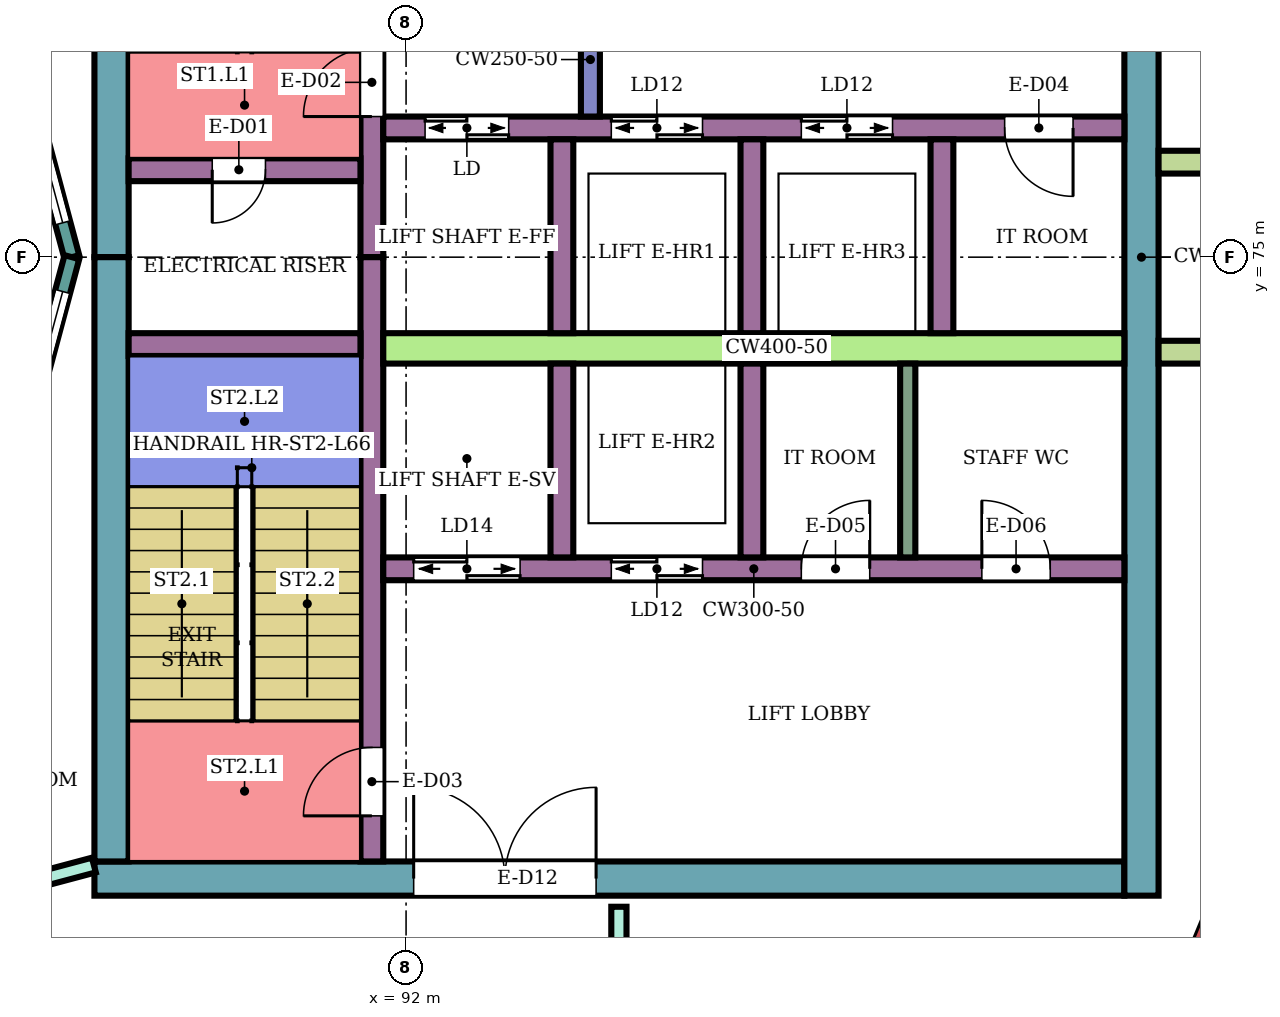
"""IFC4 building model, lengths in metres.
Left out: names, types, materials, properties, quantities, classifications, styles, units other than length and angle.
Written with IfcOpenShell. Run it as: python <this file> out.ifc"""

import sys

from ifc_helpers import new_model, si_unit, direction, frame, frame_2d, origin, place, context, subcontext, project, spatial, rectangle, extrude, element, fill, save


model = new_model("IFC4")
c1 = context("Model", 3, precision=1e-05, world=origin(), true_north=direction((0.0, 1.0)))
c2 = subcontext(c1, "Body", "Model", "MODEL_VIEW")
j1 = project(units=[si_unit("LENGTHUNIT", "METRE"), si_unit("PLANEANGLEUNIT", "RADIAN")], contexts=[c1])
p1 = place(None, origin())
s1 = spatial("IfcSite", under=j1, at=p1, CompositionType="ELEMENT")
p2 = place(p1, origin())
s2 = spatial("IfcBuilding", under=s1, at=p2, CompositionType="ELEMENT")
p3 = place(p2, frame((0.0, 0.0, 288.3)))
s3 = spatial("IfcBuildingStorey", under=s2, at=p3, CompositionType="ELEMENT", Elevation=288.3)
p4 = place(p3, frame((87.9, 66.825, 0.0), z_axis=(0.0, 0.0, 1.0), x_axis=(1.0, 0.0, 0.0)))
e1 = element("IfcWall", 1, at=p4, inside=s3, PredefinedType="SHEAR", context=c2, shape_type="SweptSolid", body=[
    extrude(rectangle(XDim=13.55, YDim=0.45, at=frame_2d((6.775, 0.0))), origin(), (0.0, 0.0, 1.0), 3.88),
])
p5 = place(p4, frame((4.2, 0.0, 0.0)))
e2 = element("IfcOpeningElement", 2, at=p5, cuts=e1, PredefinedType="OPENING", context=c2, shape_type="SweptSolid", body=[
    extrude(rectangle(XDim=2.4, YDim=2.4, at=frame_2d((1.2, 1.2))), frame((0.0, 0.235, 0.0), z_axis=(0.0, -1.0, 0.0), x_axis=(1.0, 0.0, 0.0)), (0.0, 0.0, 1.0), 0.47),
])
for number, where, z_axis, x_axis in (
    (3, (88.125, 75.0, 0.0), (0.0, 0.0, 1.0), (0.0, 1.0, 0.0)),
    (4, (88.125, 67.05, 0.0), (0.0, 0.0, 1.0), (0.0, 1.0, 0.0)),
):
    element("IfcWall", number, at=place(p3, frame(where, z_axis=z_axis, x_axis=x_axis)), inside=s3, PredefinedType="SHEAR", context=c2, shape_type="SweptSolid", body=[
        extrude(rectangle(XDim=7.95, YDim=0.45, at=frame_2d((3.975, 0.0))), origin(), (0.0, 0.0, 1.0), 3.88),
    ])
p6 = place(p3, frame((101.675, 66.6, 0.0), z_axis=(0.0, 0.0, 1.0), x_axis=(0.0, 1.0, 0.0)))
e5 = element("IfcWall", 5, at=p6, inside=s3, PredefinedType="SHEAR", context=c2, shape_type="SweptSolid", body=[
    extrude(rectangle(XDim=16.8, YDim=0.45, at=frame_2d((8.4, 0.0))), origin(), (0.0, 0.0, 1.0), 3.88),
])
p7 = place(p3, frame((91.55, 75.0, 0.0), z_axis=(0.0, 0.0, 1.0), x_axis=(0.0, 1.0, 0.0)))
e6 = element("IfcWall", 6, at=p7, inside=s3, PredefinedType="SHEAR", context=c2, shape_type="SweptSolid", body=[
    extrude(rectangle(XDim=7.95, YDim=0.3, at=frame_2d((3.975, 0.0))), origin(), (0.0, 0.0, 1.0), 3.88),
])
p8 = place(p7, frame((1.85, 0.0, 0.0)))
e7 = element("IfcOpeningElement", 7, at=p8, cuts=e6, PredefinedType="OPENING", context=c2, shape_type="SweptSolid", body=[
    extrude(rectangle(XDim=0.9, YDim=2.1, at=frame_2d((0.45, 1.05))), frame((0.0, 0.16, 0.0), z_axis=(0.0, -1.0, 0.0), x_axis=(1.0, 0.0, 0.0)), (0.0, 0.0, 1.0), 0.32),
])
p9 = place(p3, frame((91.55, 67.05, 0.0), z_axis=(0.0, 0.0, 1.0), x_axis=(0.0, 1.0, 0.0)))
e8 = element("IfcWall", 8, at=p9, inside=s3, PredefinedType="SHEAR", context=c2, shape_type="SweptSolid", body=[
    extrude(rectangle(XDim=7.95, YDim=0.3, at=frame_2d((3.975, 0.0))), origin(), (0.0, 0.0, 1.0), 3.88),
])
p10 = place(p9, frame((0.6, 0.0, 0.0)))
e9 = element("IfcOpeningElement", 9, at=p10, cuts=e8, PredefinedType="OPENING", context=c2, shape_type="SweptSolid", body=[
    extrude(rectangle(XDim=0.9, YDim=2.1, at=frame_2d((0.45, 1.05))), frame((0.0, 0.16, 0.0), z_axis=(0.0, -1.0, 0.0), x_axis=(1.0, 0.0, 0.0)), (0.0, 0.0, 1.0), 0.32),
])
p11 = place(p3, frame((88.35, 76.15, 0.0), z_axis=(0.0, 0.0, 1.0), x_axis=(1.0, 0.0, 0.0)))
e10 = element("IfcWall", 10, at=p11, inside=s3, PredefinedType="SHEAR", context=c2, shape_type="SweptSolid", body=[
    extrude(rectangle(XDim=3.05, YDim=0.3, at=frame_2d((1.525, 0.0))), origin(), (0.0, 0.0, 1.0), 3.88),
])
p12 = place(p11, frame((1.1, 0.0, 0.0)))
e11 = element("IfcOpeningElement", 11, at=p12, cuts=e10, PredefinedType="OPENING", context=c2, shape_type="SweptSolid", body=[
    extrude(rectangle(XDim=0.7, YDim=2.0, at=frame_2d((0.35, 1.0))), frame((0.0, 0.16, 0.0), z_axis=(0.0, -1.0, 0.0), x_axis=(1.0, 0.0, 0.0)), (0.0, 0.0, 1.0), 0.32),
])
p13 = place(p3, frame((88.35, 73.85, 0.0), z_axis=(0.0, 0.0, 1.0), x_axis=(1.0, 0.0, 0.0)))
e12 = element("IfcWall", 12, at=p13, inside=s3, PredefinedType="SHEAR", context=c2, shape_type="SweptSolid", body=[
    extrude(rectangle(XDim=3.05, YDim=0.3, at=frame_2d((1.525, 0.0))), origin(), (0.0, 0.0, 1.0), 3.88),
])
p14 = place(p3, frame((91.7, 76.7, 0.0), z_axis=(0.0, 0.0, 1.0), x_axis=(1.0, 0.0, 0.0)))
e13 = element("IfcWall", 13, at=p14, inside=s3, PredefinedType="SHEAR", context=c2, shape_type="SweptSolid", body=[
    extrude(rectangle(XDim=9.75, YDim=0.3, at=frame_2d((4.875, 0.0))), origin(), (0.0, 0.0, 1.0), 3.88),
])
p15 = place(p14, frame((0.55, 0.0, 0.0)))
e14 = element("IfcOpeningElement", 14, at=p15, cuts=e13, PredefinedType="OPENING", context=c2, shape_type="SweptSolid", body=[
    extrude(rectangle(XDim=1.1, YDim=2.1, at=frame_2d((0.55, 1.05))), frame((0.0, 0.16, 0.0), z_axis=(0.0, -1.0, 0.0), x_axis=(1.0, 0.0, 0.0)), (0.0, 0.0, 1.0), 0.32),
])
p16 = place(p14, frame((3.0, 0.0, 0.0)))
e15 = element("IfcOpeningElement", 15, at=p16, cuts=e13, PredefinedType="OPENING", context=c2, shape_type="SweptSolid", body=[
    extrude(rectangle(XDim=1.2, YDim=2.1, at=frame_2d((0.6, 1.05))), frame((0.0, 0.16, 0.0), z_axis=(0.0, -1.0, 0.0), x_axis=(1.0, 0.0, 0.0)), (0.0, 0.0, 1.0), 0.32),
])
p17 = place(p14, frame((5.5, 0.0, 0.0)))
e16 = element("IfcOpeningElement", 16, at=p17, cuts=e13, PredefinedType="OPENING", context=c2, shape_type="SweptSolid", body=[
    extrude(rectangle(XDim=1.2, YDim=2.1, at=frame_2d((0.6, 1.05))), frame((0.0, 0.16, 0.0), z_axis=(0.0, -1.0, 0.0), x_axis=(1.0, 0.0, 0.0)), (0.0, 0.0, 1.0), 0.32),
])
p18 = place(p14, frame((8.175, 0.0, 0.0)))
e17 = element("IfcOpeningElement", 17, at=p18, cuts=e13, PredefinedType="OPENING", context=c2, shape_type="SweptSolid", body=[
    extrude(rectangle(XDim=0.9, YDim=2.1, at=frame_2d((0.45, 1.05))), frame((0.0, 0.16, 0.0), z_axis=(0.0, -1.0, 0.0), x_axis=(1.0, 0.0, 0.0)), (0.0, 0.0, 1.0), 0.32),
])
p19 = place(p3, frame((91.7, 73.8, 0.0), z_axis=(0.0, 0.0, 1.0), x_axis=(1.0, 0.0, 0.0)))
e18 = element("IfcWall", 18, at=p19, inside=s3, PredefinedType="SHEAR", context=c2, shape_type="SweptSolid", body=[
    extrude(rectangle(XDim=9.75, YDim=0.4, at=frame_2d((4.875, 0.0))), origin(), (0.0, 0.0, 1.0), 3.88),
])
p20 = place(p3, frame((91.7, 70.9, 0.0), z_axis=(0.0, 0.0, 1.0), x_axis=(1.0, 0.0, 0.0)))
e19 = element("IfcWall", 19, at=p20, inside=s3, PredefinedType="SHEAR", context=c2, shape_type="SweptSolid", body=[
    extrude(rectangle(XDim=9.75, YDim=0.3, at=frame_2d((4.875, 0.0))), origin(), (0.0, 0.0, 1.0), 3.88),
])
p21 = place(p20, frame((0.4, 0.0, 0.0)))
e20 = element("IfcOpeningElement", 20, at=p21, cuts=e19, PredefinedType="OPENING", context=c2, shape_type="SweptSolid", body=[
    extrude(rectangle(XDim=1.4, YDim=2.1, at=frame_2d((0.7, 1.05))), frame((0.0, 0.16, 0.0), z_axis=(0.0, -1.0, 0.0), x_axis=(1.0, 0.0, 0.0)), (0.0, 0.0, 1.0), 0.32),
])
p22 = place(p20, frame((3.0, 0.0, 0.0)))
e21 = element("IfcOpeningElement", 21, at=p22, cuts=e19, PredefinedType="OPENING", context=c2, shape_type="SweptSolid", body=[
    extrude(rectangle(XDim=1.2, YDim=2.1, at=frame_2d((0.6, 1.05))), frame((0.0, 0.16, 0.0), z_axis=(0.0, -1.0, 0.0), x_axis=(1.0, 0.0, 0.0)), (0.0, 0.0, 1.0), 0.32),
])
p23 = place(p20, frame((5.5, 0.0, 0.0)))
e22 = element("IfcOpeningElement", 22, at=p23, cuts=e19, PredefinedType="OPENING", context=c2, shape_type="SweptSolid", body=[
    extrude(rectangle(XDim=0.9, YDim=2.1, at=frame_2d((0.45, 1.05))), frame((0.0, 0.16, 0.0), z_axis=(0.0, -1.0, 0.0), x_axis=(1.0, 0.0, 0.0)), (0.0, 0.0, 1.0), 0.32),
])
p24 = place(p20, frame((7.875, 0.0, 0.0)))
e23 = element("IfcOpeningElement", 23, at=p24, cuts=e19, PredefinedType="OPENING", context=c2, shape_type="SweptSolid", body=[
    extrude(rectangle(XDim=0.9, YDim=2.1, at=frame_2d((0.45, 1.05))), frame((0.0, 0.16, 0.0), z_axis=(0.0, -1.0, 0.0), x_axis=(1.0, 0.0, 0.0)), (0.0, 0.0, 1.0), 0.32),
])
for number, where, z_axis, x_axis in (
    (24, (94.05, 74.0, 0.0), (0.0, 0.0, 1.0), (0.0, 1.0, 0.0)),
    (25, (96.55, 74.0, 0.0), (0.0, 0.0, 1.0), (0.0, 1.0, 0.0)),
    (26, (99.05, 74.0, 0.0), (0.0, 0.0, 1.0), (0.0, 1.0, 0.0)),
    (27, (94.05, 71.05, 0.0), (0.0, 0.0, 1.0), (0.0, 1.0, 0.0)),
    (28, (96.55, 71.05, 0.0), (0.0, 0.0, 1.0), (0.0, 1.0, 0.0)),
):
    element("IfcWall", number, at=place(p3, frame(where, z_axis=z_axis, x_axis=x_axis)), inside=s3, PredefinedType="SHEAR", context=c2, shape_type="SweptSolid", body=[
        extrude(rectangle(XDim=2.55, YDim=0.3, at=frame_2d((1.275, 0.0))), origin(), (0.0, 0.0, 1.0), 3.88),
    ])
p25 = place(p3, frame((94.425, 76.85, 0.0), z_axis=(0.0, 0.0, 1.0), x_axis=(0.0, 1.0, 0.0)))
e29 = element("IfcWall", 29, at=p25, inside=s3, PredefinedType="SHEAR", context=c2, shape_type="SweptSolid", body=[
    extrude(rectangle(XDim=1.5, YDim=0.25, at=frame_2d((0.75, 0.0))), origin(), (0.0, 0.0, 1.0), 3.88),
])
for number, where, z_axis, x_axis in (
    (30, (101.9, 73.75, 0.0), (0.0, 0.0, 1.0), (1.0, 0.0, 0.0)),
    (31, (101.9, 76.25, 0.0), (0.0, 0.0, 1.0), (1.0, 0.0, 0.0)),
):
    element("IfcWall", number, at=place(p3, frame(where, z_axis=z_axis, x_axis=x_axis)), inside=s3, PredefinedType="NOTDEFINED", context=c2, shape_type="SweptSolid", body=[
        extrude(rectangle(XDim=2.416, YDim=0.3, at=frame_2d((1.208, 0.0))), origin(), (0.0, 0.0, 1.0), 4.2),
    ])
p26 = place(p3, frame((87.604, 75.0, 0.0), z_axis=(0.0, 0.0, 1.0), x_axis=(-0.258789828301, 0.965933654434, 0.0)))
e32 = element("IfcWall", 32, at=p26, inside=s3, PredefinedType="NOTDEFINED", context=c2, shape_type="SweptSolid", body=[
    extrude(rectangle(XDim=3.936, YDim=0.2, at=frame_2d((1.968, 0.0))), origin(), (0.0, 0.0, 1.0), 4.2),
])
p27 = place(p26, frame((0.468, 0.0, 0.9)))
e33 = element("IfcOpeningElement", 33, at=p27, cuts=e32, PredefinedType="OPENING", context=c2, shape_type="SweptSolid", body=[
    extrude(rectangle(XDim=3.0, YDim=2.3, at=frame_2d((1.5, 1.15))), frame((0.0, 0.11, 0.0), z_axis=(0.0, -1.0, 0.0), x_axis=(1.0, 0.0, 0.0)), (0.0, 0.0, 1.0), 0.22),
])
p28 = place(p3, frame((86.585, 71.198, 0.0), z_axis=(0.0, 0.0, 1.0), x_axis=(0.258789828301, 0.965933654434, 0.0)))
e34 = element("IfcWall", 34, at=p28, inside=s3, PredefinedType="NOTDEFINED", context=c2, shape_type="SweptSolid", body=[
    extrude(rectangle(XDim=3.936, YDim=0.2, at=frame_2d((1.968, 0.0))), origin(), (0.0, 0.0, 1.0), 4.2),
])
p29 = place(p28, frame((0.468, 0.0, 0.9)))
e35 = element("IfcOpeningElement", 35, at=p29, cuts=e34, PredefinedType="OPENING", context=c2, shape_type="SweptSolid", body=[
    extrude(rectangle(XDim=3.0, YDim=2.3, at=frame_2d((1.5, 1.15))), frame((0.0, 0.11, 0.0), z_axis=(0.0, -1.0, 0.0), x_axis=(1.0, 0.0, 0.0)), (0.0, 0.0, 1.0), 0.22),
])
p30 = place(p3, frame((80.125, 64.932, 0.0), z_axis=(0.0, 0.0, 1.0), x_axis=(0.966236955806, 0.257655089674, 0.0)))
e36 = element("IfcWall", 36, at=p30, inside=s3, PredefinedType="PARTITIONING", context=c2, shape_type="SweptSolid", body=[
    extrude(rectangle(XDim=8.039, YDim=0.2, at=frame_2d((4.02, 0.0))), origin(), (0.0, 0.0, 1.0), 3.75),
])
p31 = place(p30, frame((6.298, 0.0, 0.0)))
e37 = element("IfcOpeningElement", 37, at=p31, cuts=e36, PredefinedType="OPENING", context=c2, shape_type="SweptSolid", body=[
    extrude(rectangle(XDim=0.9, YDim=2.1, at=frame_2d((0.45, 1.05))), frame((0.0, 0.11, 0.0), z_axis=(0.0, -1.0, 0.0), x_axis=(1.0, 0.0, 0.0)), (0.0, 0.0, 1.0), 0.22),
])
p32 = place(p30, frame((2.045, 0.0, 0.0)))
e38 = element("IfcOpeningElement", 38, at=p32, cuts=e36, PredefinedType="OPENING", context=c2, shape_type="SweptSolid", body=[
    extrude(rectangle(XDim=0.9, YDim=2.1, at=frame_2d((0.45, 1.05))), frame((0.0, 0.11, 0.0), z_axis=(0.0, -1.0, 0.0), x_axis=(1.0, 0.0, 0.0)), (0.0, 0.0, 1.0), 0.22),
])
p33 = place(p3, frame((94.8, 65.1, 0.0), z_axis=(0.0, 0.0, 1.0), x_axis=(0.0, 1.0, 0.0)))
e39 = element("IfcWall", 39, at=p33, inside=s3, PredefinedType="PARTITIONING", context=c2, shape_type="SweptSolid", body=[
    extrude(rectangle(XDim=1.354, YDim=0.2, at=frame_2d((0.677, 0.0))), origin(), (0.0, 0.0, 1.0), 3.75),
])
p34 = place(p3, frame((98.6, 71.05, 0.0), z_axis=(0.0, 0.0, 1.0), x_axis=(0.0, 1.0, 0.0)))
e40 = element("IfcWall", 40, at=p34, inside=s3, PredefinedType="PARTITIONING", context=c2, shape_type="SweptSolid", body=[
    extrude(rectangle(XDim=2.55, YDim=0.2, at=frame_2d((1.275, 0.0))), origin(), (0.0, 0.0, 1.0), 3.88),
])
p35 = place(p27, origin())
e41 = element("IfcWindow", 41, at=p35, inside=s3, PartitioningType="SINGLE_PANEL", PredefinedType="WINDOW", context=c2, shape_type="SweptSolid", body=[
    extrude(rectangle(XDim=3.0, YDim=2.3, at=frame_2d((1.5, 1.15))), frame((0.0, 0.03, 0.0), z_axis=(0.0, -1.0, 0.0), x_axis=(1.0, 0.0, 0.0)), (0.0, 0.0, 1.0), 0.06),
])
fill(e33, e41)
p36 = place(p29, origin())
e42 = element("IfcWindow", 42, at=p36, inside=s3, PartitioningType="SINGLE_PANEL", PredefinedType="WINDOW", context=c2, shape_type="SweptSolid", body=[
    extrude(rectangle(XDim=3.0, YDim=2.3, at=frame_2d((1.5, 1.15))), frame((0.0, 0.03, 0.0), z_axis=(0.0, -1.0, 0.0), x_axis=(1.0, 0.0, 0.0)), (0.0, 0.0, 1.0), 0.06),
])
fill(e35, e42)
p37 = place(p12, frame((0.7, 0.0, 0.0), z_axis=(0.0, 0.0, 1.0), x_axis=(-1.0, 0.0, 0.0)))
e43 = element("IfcDoor", 43, at=p37, inside=s3, OperationType="SINGLE_SWING_RIGHT", PredefinedType="DOOR", context=c2, shape_type="SweptSolid", body=[
    extrude(rectangle(XDim=0.7, YDim=2.0, at=frame_2d((0.35, 1.0))), frame((0.0, 0.025, 0.0), z_axis=(0.0, -1.0, 0.0), x_axis=(1.0, 0.0, 0.0)), (0.0, 0.0, 1.0), 0.05),
])
fill(e11, e43)
p38 = place(p8, origin())
e44 = element("IfcDoor", 44, at=p38, inside=s3, OperationType="SINGLE_SWING_LEFT", PredefinedType="DOOR", context=c2, shape_type="SweptSolid", body=[
    extrude(rectangle(XDim=0.9, YDim=2.1, at=frame_2d((0.45, 1.05))), frame((0.0, 0.025, 0.0), z_axis=(0.0, -1.0, 0.0), x_axis=(1.0, 0.0, 0.0)), (0.0, 0.0, 1.0), 0.05),
])
fill(e7, e44)
p39 = place(p10, origin())
e45 = element("IfcDoor", 45, at=p39, inside=s3, OperationType="SINGLE_SWING_LEFT", PredefinedType="DOOR", context=c2, shape_type="SweptSolid", body=[
    extrude(rectangle(XDim=0.9, YDim=2.1, at=frame_2d((0.45, 1.05))), frame((0.0, 0.025, 0.0), z_axis=(0.0, -1.0, 0.0), x_axis=(1.0, 0.0, 0.0)), (0.0, 0.0, 1.0), 0.05),
])
fill(e9, e45)
p40 = place(p15, origin())
e46 = element("IfcDoor", 46, at=p40, inside=s3, OperationType="DOUBLE_DOOR_SLIDING", PredefinedType="DOOR", context=c2, shape_type="SweptSolid", body=[
    extrude(rectangle(XDim=1.1, YDim=2.1, at=frame_2d((0.55, 1.05))), frame((0.0, 0.025, 0.0), z_axis=(0.0, -1.0, 0.0), x_axis=(1.0, 0.0, 0.0)), (0.0, 0.0, 1.0), 0.05),
])
fill(e14, e46)
p41 = place(p16, origin())
e47 = element("IfcDoor", 47, at=p41, inside=s3, OperationType="DOUBLE_DOOR_SLIDING", PredefinedType="DOOR", context=c2, shape_type="SweptSolid", body=[
    extrude(rectangle(XDim=1.2, YDim=2.1, at=frame_2d((0.6, 1.05))), frame((0.0, 0.025, 0.0), z_axis=(0.0, -1.0, 0.0), x_axis=(1.0, 0.0, 0.0)), (0.0, 0.0, 1.0), 0.05),
])
fill(e15, e47)
p42 = place(p17, origin())
e48 = element("IfcDoor", 48, at=p42, inside=s3, OperationType="DOUBLE_DOOR_SLIDING", PredefinedType="DOOR", context=c2, shape_type="SweptSolid", body=[
    extrude(rectangle(XDim=1.2, YDim=2.1, at=frame_2d((0.6, 1.05))), frame((0.0, 0.025, 0.0), z_axis=(0.0, -1.0, 0.0), x_axis=(1.0, 0.0, 0.0)), (0.0, 0.0, 1.0), 0.05),
])
fill(e16, e48)
p43 = place(p18, frame((0.9, 0.0, 0.0), z_axis=(0.0, 0.0, 1.0), x_axis=(-1.0, 0.0, 0.0)))
e49 = element("IfcDoor", 49, at=p43, inside=s3, OperationType="SINGLE_SWING_LEFT", PredefinedType="DOOR", context=c2, shape_type="SweptSolid", body=[
    extrude(rectangle(XDim=0.9, YDim=2.1, at=frame_2d((0.45, 1.05))), frame((0.0, 0.025, 0.0), z_axis=(0.0, -1.0, 0.0), x_axis=(1.0, 0.0, 0.0)), (0.0, 0.0, 1.0), 0.05),
])
fill(e17, e49)
p44 = place(p21, origin())
e50 = element("IfcDoor", 50, at=p44, inside=s3, OperationType="DOUBLE_DOOR_SLIDING", PredefinedType="DOOR", context=c2, shape_type="SweptSolid", body=[
    extrude(rectangle(XDim=1.4, YDim=2.1, at=frame_2d((0.7, 1.05))), frame((0.0, 0.025, 0.0), z_axis=(0.0, -1.0, 0.0), x_axis=(1.0, 0.0, 0.0)), (0.0, 0.0, 1.0), 0.05),
])
fill(e20, e50)
p45 = place(p22, origin())
e51 = element("IfcDoor", 51, at=p45, inside=s3, OperationType="DOUBLE_DOOR_SLIDING", PredefinedType="DOOR", context=c2, shape_type="SweptSolid", body=[
    extrude(rectangle(XDim=1.2, YDim=2.1, at=frame_2d((0.6, 1.05))), frame((0.0, 0.025, 0.0), z_axis=(0.0, -1.0, 0.0), x_axis=(1.0, 0.0, 0.0)), (0.0, 0.0, 1.0), 0.05),
])
fill(e21, e51)
p46 = place(p23, origin())
e52 = element("IfcDoor", 52, at=p46, inside=s3, OperationType="SINGLE_SWING_RIGHT", PredefinedType="DOOR", context=c2, shape_type="SweptSolid", body=[
    extrude(rectangle(XDim=0.9, YDim=2.1, at=frame_2d((0.45, 1.05))), frame((0.0, 0.025, 0.0), z_axis=(0.0, -1.0, 0.0), x_axis=(1.0, 0.0, 0.0)), (0.0, 0.0, 1.0), 0.05),
])
fill(e22, e52)
p47 = place(p24, origin())
e53 = element("IfcDoor", 53, at=p47, inside=s3, OperationType="SINGLE_SWING_LEFT", PredefinedType="DOOR", context=c2, shape_type="SweptSolid", body=[
    extrude(rectangle(XDim=0.9, YDim=2.1, at=frame_2d((0.45, 1.05))), frame((0.0, 0.025, 0.0), z_axis=(0.0, -1.0, 0.0), x_axis=(1.0, 0.0, 0.0)), (0.0, 0.0, 1.0), 0.05),
])
fill(e23, e53)
p48 = place(p5, origin())
e54 = element("IfcDoor", 54, at=p48, inside=s3, OperationType="DOUBLE_DOOR_SINGLE_SWING", PredefinedType="DOOR", context=c2, shape_type="SweptSolid", body=[
    extrude(rectangle(XDim=2.4, YDim=2.4, at=frame_2d((1.2, 1.2))), frame((0.0, 0.025, 0.0), z_axis=(0.0, -1.0, 0.0), x_axis=(1.0, 0.0, 0.0)), (0.0, 0.0, 1.0), 0.05),
])
fill(e2, e54)
save(model, sys.argv[1])
